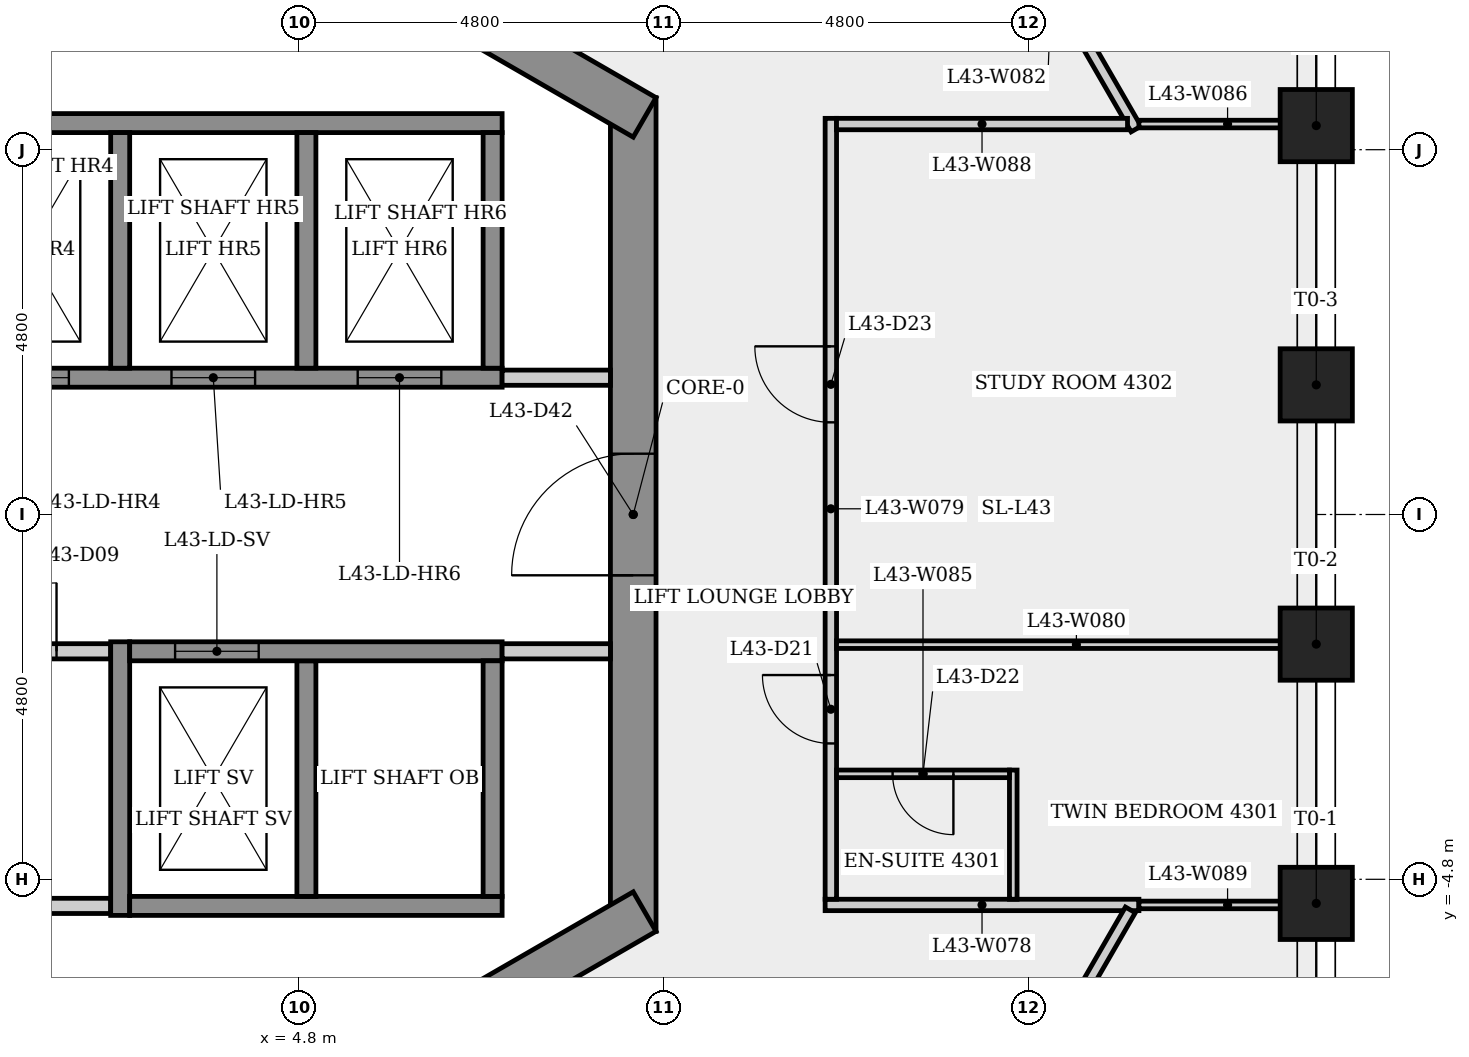
"""IFC4 building model, lengths in metres.
Left out: names, types, materials, properties, quantities, classifications, styles, units other than length and angle.
Written with IfcOpenShell. Run it as: python <this file> out.ifc"""

import sys

from ifc_helpers import new_model, si_unit, direction, frame, frame_2d, origin, origin_2d, place, context, subcontext, project, spatial, rectangle, extrude, element, fill, save


model = new_model("IFC4")
c1 = context("Model", 3, precision=1e-05, world=origin(), true_north=direction((0.0, 1.0)))
c2 = subcontext(c1, "Body", "Model", "MODEL_VIEW")
j1 = project(units=[si_unit("LENGTHUNIT", "METRE"), si_unit("PLANEANGLEUNIT", "RADIAN")], contexts=[c1])
p1 = place(None, origin())
s1 = spatial("IfcSite", under=j1, at=p1, CompositionType="ELEMENT")
p2 = place(p1, origin())
s2 = spatial("IfcBuilding", under=s1, at=p2, CompositionType="ELEMENT")
p3 = place(p2, frame((0.0, 0.0, 162.9)))
s3 = spatial("IfcBuildingStorey", under=s2, at=p3, CompositionType="ELEMENT", Elevation=162.9)
p4 = place(p3, frame((9.2, -5.485, 0.0), z_axis=(0.0, 0.0, 1.0), x_axis=(0.0, 1.0, 0.0)))
e1 = element("IfcWall", 1, at=p4, inside=s3, PredefinedType="SHEAR", context=c2, shape_type="SweptSolid", body=[
    extrude(rectangle(XDim=10.97, YDim=0.6, at=frame_2d((5.485, 0.0))), origin(), (0.0, 0.0, 1.0), 3.4),
])
p5 = place(p4, frame((4.685, 0.0, 0.0)))
e2 = element("IfcOpeningElement", 2, at=p5, cuts=e1, PredefinedType="OPENING", context=c2, shape_type="SweptSolid", body=[
    extrude(rectangle(XDim=1.6, YDim=2.1, at=frame_2d((0.8, 1.05))), frame((0.0, 0.31, 0.0), z_axis=(0.0, -1.0, 0.0), x_axis=(1.0, 0.0, 0.0)), (0.0, 0.0, 1.0), 0.62),
])
p6 = place(p3, frame((9.35, 5.225, 0.0), z_axis=(0.0, 0.0, 1.0), x_axis=(-0.866023993627, 0.500002442456, 0.0)))
e3 = element("IfcWall", 3, at=p6, inside=s3, PredefinedType="SHEAR", context=c2, shape_type="SweptSolid", body=[
    extrude(rectangle(XDim=10.97, YDim=0.6, at=frame_2d((5.485, 0.0))), origin(), (0.0, 0.0, 1.0), 3.4),
])
p7 = place(p6, frame((5.393, 0.0, 0.0)))
e4 = element("IfcOpeningElement", 4, at=p7, cuts=e3, PredefinedType="OPENING", context=c2, shape_type="SweptSolid", body=[
    extrude(rectangle(XDim=0.9, YDim=2.1, at=frame_2d((0.45, 1.05))), frame((0.0, 0.31, 0.0), z_axis=(0.0, -1.0, 0.0), x_axis=(1.0, 0.0, 0.0)), (0.0, 0.0, 1.0), 0.62),
])
p8 = place(p3, frame((-0.15, -10.71, 0.0), z_axis=(0.0, 0.0, 1.0), x_axis=(0.866023993627, 0.500002442456, 0.0)))
e5 = element("IfcWall", 5, at=p8, inside=s3, PredefinedType="SHEAR", context=c2, shape_type="SweptSolid", body=[
    extrude(rectangle(XDim=10.97, YDim=0.6, at=frame_2d((5.485, 0.0))), origin(), (0.0, 0.0, 1.0), 3.4),
])
p9 = place(p8, frame((7.166, 0.0, 0.0)))
e6 = element("IfcOpeningElement", 6, at=p9, cuts=e5, PredefinedType="OPENING", context=c2, shape_type="SweptSolid", body=[
    extrude(rectangle(XDim=0.9, YDim=2.1, at=frame_2d((0.45, 1.05))), frame((0.0, 0.31, 0.0), z_axis=(0.0, -1.0, 0.0), x_axis=(1.0, 0.0, 0.0)), (0.0, 0.0, 1.0), 0.62),
])
for number, where, z_axis, x_axis in (
    (7, (18.187, -5.117, 0.0), (0.0, 0.0, 1.0), (1.0, 0.0, 0.0)),
    (8, (18.187, -1.706, 0.0), (0.0, 0.0, 1.0), (1.0, 0.0, 0.0)),
    (9, (18.187, 1.706, 0.0), (0.0, 0.0, 1.0), (1.0, 0.0, 0.0)),
    (10, (18.187, 5.117, 0.0), (0.0, 0.0, 1.0), (1.0, 0.0, 0.0)),
):
    element("IfcColumn", number, at=place(p3, frame(where, z_axis=z_axis, x_axis=x_axis)), inside=s3, PredefinedType="COLUMN", context=c2, shape_type="SweptSolid", body=[
        extrude(rectangle(XDim=0.95, YDim=0.95, at=origin_2d()), origin(), (0.0, 0.0, 1.0), 3.4),
    ])
p10 = place(p3, frame((-8.88, -5.15, 0.0), z_axis=(0.0, 0.0, 1.0), x_axis=(1.0, 0.0, 0.0)))
e11 = element("IfcWall", 11, at=p10, inside=s3, PredefinedType="PARTITIONING", context=c2, shape_type="SweptSolid", body=[
    extrude(rectangle(XDim=11.205, YDim=0.2, at=frame_2d((5.603, 0.0))), origin(), (0.0, 0.0, 1.0), 3.05),
])
p11 = place(p3, frame((-7.475, 1.8, 0.0), z_axis=(0.0, 0.0, 1.0), x_axis=(1.0, 0.0, 0.0)))
e12 = element("IfcWall", 12, at=p11, inside=s3, PredefinedType="SHEAR", context=c2, shape_type="SweptSolid", body=[
    extrude(rectangle(XDim=14.95, YDim=0.25, at=frame_2d((7.475, 0.0))), origin(), (0.0, 0.0, 1.0), 3.05),
])
p12 = place(p11, frame((0.8, 0.0, 0.0)))
e13 = element("IfcOpeningElement", 13, at=p12, cuts=e12, PredefinedType="OPENING", context=c2, shape_type="SweptSolid", body=[
    extrude(rectangle(XDim=1.1, YDim=2.1, at=frame_2d((0.55, 1.05))), frame((0.0, 0.135, 0.0), z_axis=(0.0, -1.0, 0.0), x_axis=(1.0, 0.0, 0.0)), (0.0, 0.0, 1.0), 0.27),
])
p13 = place(p11, frame((3.25, 0.0, 0.0)))
e14 = element("IfcOpeningElement", 14, at=p13, cuts=e12, PredefinedType="OPENING", context=c2, shape_type="SweptSolid", body=[
    extrude(rectangle(XDim=1.1, YDim=2.1, at=frame_2d((0.55, 1.05))), frame((0.0, 0.135, 0.0), z_axis=(0.0, -1.0, 0.0), x_axis=(1.0, 0.0, 0.0)), (0.0, 0.0, 1.0), 0.27),
])
p14 = place(p11, frame((5.7, 0.0, 0.0)))
e15 = element("IfcOpeningElement", 15, at=p14, cuts=e12, PredefinedType="OPENING", context=c2, shape_type="SweptSolid", body=[
    extrude(rectangle(XDim=1.1, YDim=2.1, at=frame_2d((0.55, 1.05))), frame((0.0, 0.135, 0.0), z_axis=(0.0, -1.0, 0.0), x_axis=(1.0, 0.0, 0.0)), (0.0, 0.0, 1.0), 0.27),
])
p15 = place(p11, frame((8.15, 0.0, 0.0)))
e16 = element("IfcOpeningElement", 16, at=p15, cuts=e12, PredefinedType="OPENING", context=c2, shape_type="SweptSolid", body=[
    extrude(rectangle(XDim=1.1, YDim=2.1, at=frame_2d((0.55, 1.05))), frame((0.0, 0.135, 0.0), z_axis=(0.0, -1.0, 0.0), x_axis=(1.0, 0.0, 0.0)), (0.0, 0.0, 1.0), 0.27),
])
p16 = place(p11, frame((10.6, 0.0, 0.0)))
e17 = element("IfcOpeningElement", 17, at=p16, cuts=e12, PredefinedType="OPENING", context=c2, shape_type="SweptSolid", body=[
    extrude(rectangle(XDim=1.1, YDim=2.1, at=frame_2d((0.55, 1.05))), frame((0.0, 0.135, 0.0), z_axis=(0.0, -1.0, 0.0), x_axis=(1.0, 0.0, 0.0)), (0.0, 0.0, 1.0), 0.27),
])
p17 = place(p11, frame((13.05, 0.0, 0.0)))
e18 = element("IfcOpeningElement", 18, at=p17, cuts=e12, PredefinedType="OPENING", context=c2, shape_type="SweptSolid", body=[
    extrude(rectangle(XDim=1.1, YDim=2.1, at=frame_2d((0.55, 1.05))), frame((0.0, 0.135, 0.0), z_axis=(0.0, -1.0, 0.0), x_axis=(1.0, 0.0, 0.0)), (0.0, 0.0, 1.0), 0.27),
])
p18 = place(p3, frame((-7.225, 5.15, 0.0), z_axis=(0.0, 0.0, 1.0), x_axis=(1.0, 0.0, 0.0)))
e19 = element("IfcWall", 19, at=p18, inside=s3, PredefinedType="SHEAR", context=c2, shape_type="SweptSolid", body=[
    extrude(rectangle(XDim=14.7, YDim=0.25, at=frame_2d((7.35, 0.0))), origin(), (0.0, 0.0, 1.0), 3.05),
])
p19 = place(p3, frame((-8.9, -1.8, 0.0), z_axis=(0.0, 0.0, 1.0), x_axis=(1.0, 0.0, 0.0)))
e20 = element("IfcWall", 20, at=p19, inside=s3, PredefinedType="PARTITIONING", context=c2, shape_type="SweptSolid", body=[
    extrude(rectangle(XDim=11.225, YDim=0.2, at=frame_2d((5.613, 0.0))), origin(), (0.0, 0.0, 1.0), 3.05),
])
p20 = place(p19, frame((3.035, 0.0, 0.0)))
e21 = element("IfcOpeningElement", 21, at=p20, cuts=e20, PredefinedType="OPENING", context=c2, shape_type="SweptSolid", body=[
    extrude(rectangle(XDim=0.9, YDim=2.1, at=frame_2d((0.45, 1.05))), frame((0.0, 0.11, 0.0), z_axis=(0.0, -1.0, 0.0), x_axis=(1.0, 0.0, 0.0)), (0.0, 0.0, 1.0), 0.22),
])
p21 = place(p19, frame((9.613, 0.0, 0.0)))
e22 = element("IfcOpeningElement", 22, at=p21, cuts=e20, PredefinedType="OPENING", context=c2, shape_type="SweptSolid", body=[
    extrude(rectangle(XDim=0.9, YDim=2.1, at=frame_2d((0.45, 1.05))), frame((0.0, 0.11, 0.0), z_axis=(0.0, -1.0, 0.0), x_axis=(1.0, 0.0, 0.0)), (0.0, 0.0, 1.0), 0.22),
])
p22 = place(p3, frame((2.45, -5.275, 0.0), z_axis=(0.0, 0.0, 1.0), x_axis=(0.0, 1.0, 0.0)))
e23 = element("IfcWall", 23, at=p22, inside=s3, PredefinedType="SHEAR", context=c2, shape_type="SweptSolid", body=[
    extrude(rectangle(XDim=3.6, YDim=0.25, at=frame_2d((1.8, 0.0))), origin(), (0.0, 0.0, 1.0), 3.05),
])
p23 = place(p3, frame((2.45, 5.025, 0.0), z_axis=(0.0, 0.0, 1.0), x_axis=(0.0, -1.0, 0.0)))
e24 = element("IfcWall", 24, at=p23, inside=s3, PredefinedType="SHEAR", context=c2, shape_type="SweptSolid", body=[
    extrude(rectangle(XDim=3.1, YDim=0.25, at=frame_2d((1.55, 0.0))), origin(), (0.0, 0.0, 1.0), 3.4),
])
p24 = place(p3, frame((2.575, -5.15, 0.0), z_axis=(0.0, 0.0, 1.0), x_axis=(1.0, 0.0, 0.0)))
e25 = element("IfcWall", 25, at=p24, inside=s3, PredefinedType="SHEAR", context=c2, shape_type="SweptSolid", body=[
    extrude(rectangle(XDim=4.9, YDim=0.25, at=frame_2d((2.45, 0.0))), origin(), (0.0, 0.0, 1.0), 3.05),
])
for number, where, z_axis, x_axis in (
    (26, (4.9, -1.925, 0.0), (0.0, 0.0, 1.0), (0.0, -1.0, 0.0)),
    (27, (4.9, 5.025, 0.0), (0.0, 0.0, 1.0), (0.0, -1.0, 0.0)),
):
    element("IfcWall", number, at=place(p3, frame(where, z_axis=z_axis, x_axis=x_axis)), inside=s3, PredefinedType="SHEAR", context=c2, shape_type="SweptSolid", body=[
        extrude(rectangle(XDim=3.1, YDim=0.25, at=frame_2d((1.55, 0.0))), origin(), (0.0, 0.0, 1.0), 3.4),
    ])
p25 = place(p3, frame((2.575, -1.8, 0.0), z_axis=(0.0, 0.0, 1.0), x_axis=(1.0, 0.0, 0.0)))
e28 = element("IfcWall", 28, at=p25, inside=s3, PredefinedType="SHEAR", context=c2, shape_type="SweptSolid", body=[
    extrude(rectangle(XDim=4.9, YDim=0.25, at=frame_2d((2.45, 0.0))), origin(), (0.0, 0.0, 1.0), 3.05),
])
p26 = place(p25, frame((0.597, 0.0, 0.0)))
e29 = element("IfcOpeningElement", 29, at=p26, cuts=e28, PredefinedType="OPENING", context=c2, shape_type="SweptSolid", body=[
    extrude(rectangle(XDim=1.1, YDim=2.1, at=frame_2d((0.55, 1.05))), frame((0.0, 0.135, 0.0), z_axis=(0.0, -1.0, 0.0), x_axis=(1.0, 0.0, 0.0)), (0.0, 0.0, 1.0), 0.27),
])
p27 = place(p3, frame((7.475, 1.8, 0.0), z_axis=(0.0, 0.0, 1.0), x_axis=(1.0, 0.0, 0.0)))
e30 = element("IfcWall", 30, at=p27, inside=s3, PredefinedType="PARTITIONING", context=c2, shape_type="SweptSolid", body=[
    extrude(rectangle(XDim=1.425, YDim=0.2, at=frame_2d((0.712, 0.0))), origin(), (0.0, 0.0, 1.0), 3.05),
])
for number, where, z_axis, x_axis in (
    (31, (7.35, -1.925, 0.0), (0.0, 0.0, 1.0), (0.0, -1.0, 0.0)),
    (32, (7.35, 5.025, 0.0), (0.0, 0.0, 1.0), (0.0, -1.0, 0.0)),
):
    element("IfcWall", number, at=place(p3, frame(where, z_axis=z_axis, x_axis=x_axis)), inside=s3, PredefinedType="SHEAR", context=c2, shape_type="SweptSolid", body=[
        extrude(rectangle(XDim=3.1, YDim=0.25, at=frame_2d((1.55, 0.0))), origin(), (0.0, 0.0, 1.0), 3.4),
    ])
p28 = place(p3, frame((8.9, -1.8, 0.0), z_axis=(0.0, 0.0, 1.0), x_axis=(-1.0, 0.0, 0.0)))
e33 = element("IfcWall", 33, at=p28, inside=s3, PredefinedType="PARTITIONING", context=c2, shape_type="SweptSolid", body=[
    extrude(rectangle(XDim=1.425, YDim=0.2, at=frame_2d((0.712, 0.0))), origin(), (0.0, 0.0, 1.0), 3.05),
])
p29 = place(p3, frame((11.725, -5.137, 0.0), z_axis=(0.0, 0.0, 1.0), x_axis=(1.0, 0.0, 0.0)))
e34 = element("IfcWall", 34, at=p29, inside=s3, PredefinedType="PARTITIONING", context=c2, shape_type="SweptSolid", body=[
    extrude(rectangle(XDim=4.128, YDim=0.15, at=frame_2d((2.064, 0.0))), origin(), (0.0, 0.0, 1.0), 3.05),
])
p30 = place(p3, frame((11.8, -5.062, 0.0), z_axis=(0.0, 0.0, 1.0), x_axis=(0.0, 1.0, 0.0)))
e35 = element("IfcWall", 35, at=p30, inside=s3, PredefinedType="PARTITIONING", context=c2, shape_type="SweptSolid", body=[
    extrude(rectangle(XDim=10.275, YDim=0.15, at=frame_2d((5.137, 0.0))), origin(), (0.0, 0.0, 1.0), 3.05),
])
p31 = place(p30, frame((2.05, 0.0, 0.0)))
e36 = element("IfcOpeningElement", 36, at=p31, cuts=e35, PredefinedType="OPENING", context=c2, shape_type="SweptSolid", body=[
    extrude(rectangle(XDim=0.9, YDim=2.1, at=frame_2d((0.45, 1.05))), frame((0.0, 0.085, 0.0), z_axis=(0.0, -1.0, 0.0), x_axis=(1.0, 0.0, 0.0)), (0.0, 0.0, 1.0), 0.17),
])
p32 = place(p30, frame((6.275, 0.0, 0.0)))
e37 = element("IfcOpeningElement", 37, at=p32, cuts=e35, PredefinedType="OPENING", context=c2, shape_type="SweptSolid", body=[
    extrude(rectangle(XDim=1.0, YDim=2.1, at=frame_2d((0.5, 1.05))), frame((0.0, 0.085, 0.0), z_axis=(0.0, -1.0, 0.0), x_axis=(1.0, 0.0, 0.0)), (0.0, 0.0, 1.0), 0.17),
])
p33 = place(p3, frame((11.875, -1.712, 0.0), z_axis=(0.0, 0.0, 1.0), x_axis=(1.0, 0.0, 0.0)))
e38 = element("IfcWall", 38, at=p33, inside=s3, PredefinedType="PARTITIONING", context=c2, shape_type="SweptSolid", body=[
    extrude(rectangle(XDim=6.312, YDim=0.1, at=frame_2d((3.156, 0.0))), origin(), (0.0, 0.0, 1.0), 3.05),
])
p34 = place(p3, frame((13.592, 8.925, 0.0), z_axis=(0.0, 0.0, 1.0), x_axis=(0.500040754433, -0.866001872923, 0.0)))
e39 = element("IfcWall", 39, at=p34, inside=s3, PredefinedType="PARTITIONING", context=c2, shape_type="SweptSolid", body=[
    extrude(rectangle(XDim=4.448, YDim=0.15, at=frame_2d((2.224, 0.0))), origin(), (0.0, 0.0, 1.0), 3.05),
])
p35 = place(p34, frame((1.669, 0.0, 0.0)))
e40 = element("IfcOpeningElement", 40, at=p35, cuts=e39, PredefinedType="OPENING", context=c2, shape_type="SweptSolid", body=[
    extrude(rectangle(XDim=1.0, YDim=2.1, at=frame_2d((0.5, 1.05))), frame((0.0, 0.085, 0.0), z_axis=(0.0, -1.0, 0.0), x_axis=(1.0, 0.0, 0.0)), (0.0, 0.0, 1.0), 0.17),
])
p36 = place(p3, frame((14.2, -5.062, 0.0), z_axis=(0.0, 0.0, 1.0), x_axis=(0.0, 1.0, 0.0)))
e41 = element("IfcWall", 41, at=p36, inside=s3, PredefinedType="PARTITIONING", context=c2, shape_type="SweptSolid", body=[
    extrude(rectangle(XDim=1.7, YDim=0.1, at=frame_2d((0.85, 0.0))), origin(), (0.0, 0.0, 1.0), 3.05),
])
p37 = place(p3, frame((14.15, -3.413, 0.0), z_axis=(0.0, 0.0, 1.0), x_axis=(-1.0, 0.0, 0.0)))
e42 = element("IfcWall", 42, at=p37, inside=s3, PredefinedType="PARTITIONING", context=c2, shape_type="SweptSolid", body=[
    extrude(rectangle(XDim=2.275, YDim=0.1, at=frame_2d((1.137, 0.0))), origin(), (0.0, 0.0, 1.0), 3.05),
])
p38 = place(p37, frame((0.738, 0.0, 0.0)))
e43 = element("IfcOpeningElement", 43, at=p38, cuts=e42, PredefinedType="OPENING", context=c2, shape_type="SweptSolid", body=[
    extrude(rectangle(XDim=0.8, YDim=2.1, at=frame_2d((0.4, 1.05))), frame((0.0, 0.06, 0.0), z_axis=(0.0, -1.0, 0.0), x_axis=(1.0, 0.0, 0.0)), (0.0, 0.0, 1.0), 0.12),
])
p39 = place(p3, frame((15.853, 5.137, 0.0), z_axis=(0.0, 0.0, 1.0), x_axis=(1.0, 0.0, 0.0)))
e44 = element("IfcWall", 44, at=p39, inside=s3, PredefinedType="PARTITIONING", context=c2, shape_type="SweptSolid", body=[
    extrude(rectangle(XDim=2.333, YDim=0.1, at=frame_2d((1.167, 0.0))), origin(), (0.0, 0.0, 1.0), 3.05),
])
p40 = place(p3, frame((15.741, -5.202, 0.0), z_axis=(0.0, 0.0, 1.0), x_axis=(-0.499974030515, -0.866040396754, 0.0)))
e45 = element("IfcWall", 45, at=p40, inside=s3, PredefinedType="PARTITIONING", context=c2, shape_type="SweptSolid", body=[
    extrude(rectangle(XDim=7.812, YDim=0.15, at=frame_2d((3.906, 0.0))), origin(), (0.0, 0.0, 1.0), 3.05),
])
p41 = place(p40, frame((3.406, 0.0, 0.0)))
e46 = element("IfcOpeningElement", 46, at=p41, cuts=e45, PredefinedType="OPENING", context=c2, shape_type="SweptSolid", body=[
    extrude(rectangle(XDim=1.0, YDim=2.1, at=frame_2d((0.5, 1.05))), frame((0.0, 0.085, 0.0), z_axis=(0.0, -1.0, 0.0), x_axis=(1.0, 0.0, 0.0)), (0.0, 0.0, 1.0), 0.17),
])
p42 = place(p3, frame((15.703, 5.137, 0.0), z_axis=(0.0, 0.0, 1.0), x_axis=(-1.0, 0.0, 0.0)))
e47 = element("IfcWall", 47, at=p42, inside=s3, PredefinedType="PARTITIONING", context=c2, shape_type="SweptSolid", body=[
    extrude(rectangle(XDim=3.828, YDim=0.15, at=frame_2d((1.914, 0.0))), origin(), (0.0, 0.0, 1.0), 3.05),
])
p43 = place(p3, frame((18.187, -5.137, 0.0), z_axis=(0.0, 0.0, 1.0), x_axis=(-1.0, 0.0, 0.0)))
e48 = element("IfcWall", 48, at=p43, inside=s3, PredefinedType="PARTITIONING", context=c2, shape_type="SweptSolid", body=[
    extrude(rectangle(XDim=2.333, YDim=0.1, at=frame_2d((1.167, 0.0))), origin(), (0.0, 0.0, 1.0), 3.05),
])
p44 = place(p15, origin())
e49 = element("IfcDoor", 49, at=p44, inside=s3, OperationType="SLIDING_TO_LEFT", PredefinedType="DOOR", context=c2, shape_type="SweptSolid", body=[
    extrude(rectangle(XDim=1.1, YDim=2.1, at=frame_2d((0.55, 1.05))), frame((0.0, 0.025, 0.0), z_axis=(0.0, -1.0, 0.0), x_axis=(1.0, 0.0, 0.0)), (0.0, 0.0, 1.0), 0.05),
])
fill(e16, e49)
p45 = place(p16, origin())
e50 = element("IfcDoor", 50, at=p45, inside=s3, OperationType="SLIDING_TO_LEFT", PredefinedType="DOOR", context=c2, shape_type="SweptSolid", body=[
    extrude(rectangle(XDim=1.1, YDim=2.1, at=frame_2d((0.55, 1.05))), frame((0.0, 0.025, 0.0), z_axis=(0.0, -1.0, 0.0), x_axis=(1.0, 0.0, 0.0)), (0.0, 0.0, 1.0), 0.05),
])
fill(e17, e50)
p46 = place(p17, origin())
e51 = element("IfcDoor", 51, at=p46, inside=s3, OperationType="SLIDING_TO_LEFT", PredefinedType="DOOR", context=c2, shape_type="SweptSolid", body=[
    extrude(rectangle(XDim=1.1, YDim=2.1, at=frame_2d((0.55, 1.05))), frame((0.0, 0.025, 0.0), z_axis=(0.0, -1.0, 0.0), x_axis=(1.0, 0.0, 0.0)), (0.0, 0.0, 1.0), 0.05),
])
fill(e18, e51)
p47 = place(p26, origin())
e52 = element("IfcDoor", 52, at=p47, inside=s3, OperationType="SLIDING_TO_LEFT", PredefinedType="DOOR", context=c2, shape_type="SweptSolid", body=[
    extrude(rectangle(XDim=1.1, YDim=2.1, at=frame_2d((0.55, 1.05))), frame((0.0, 0.025, 0.0), z_axis=(0.0, -1.0, 0.0), x_axis=(1.0, 0.0, 0.0)), (0.0, 0.0, 1.0), 0.05),
])
fill(e29, e52)
p48 = place(p21, origin())
e53 = element("IfcDoor", 53, at=p48, inside=s3, OperationType="SINGLE_SWING_RIGHT", PredefinedType="DOOR", context=c2, shape_type="SweptSolid", body=[
    extrude(rectangle(XDim=0.9, YDim=2.1, at=frame_2d((0.45, 1.05))), frame((0.0, 0.025, 0.0), z_axis=(0.0, -1.0, 0.0), x_axis=(1.0, 0.0, 0.0)), (0.0, 0.0, 1.0), 0.05),
])
fill(e22, e53)
p49 = place(p31, origin())
e54 = element("IfcDoor", 54, at=p49, inside=s3, OperationType="SINGLE_SWING_RIGHT", PredefinedType="DOOR", context=c2, shape_type="SweptSolid", body=[
    extrude(rectangle(XDim=0.9, YDim=2.1, at=frame_2d((0.45, 1.05))), frame((0.0, 0.025, 0.0), z_axis=(0.0, -1.0, 0.0), x_axis=(1.0, 0.0, 0.0)), (0.0, 0.0, 1.0), 0.05),
])
fill(e36, e54)
p50 = place(p38, origin())
e55 = element("IfcDoor", 55, at=p50, inside=s3, OperationType="SINGLE_SWING_LEFT", PredefinedType="DOOR", context=c2, shape_type="SweptSolid", body=[
    extrude(rectangle(XDim=0.8, YDim=2.1, at=frame_2d((0.4, 1.05))), frame((0.0, 0.025, 0.0), z_axis=(0.0, -1.0, 0.0), x_axis=(1.0, 0.0, 0.0)), (0.0, 0.0, 1.0), 0.05),
])
fill(e43, e55)
p51 = place(p32, origin())
e56 = element("IfcDoor", 56, at=p51, inside=s3, OperationType="SINGLE_SWING_RIGHT", PredefinedType="DOOR", context=c2, shape_type="SweptSolid", body=[
    extrude(rectangle(XDim=1.0, YDim=2.1, at=frame_2d((0.5, 1.05))), frame((0.0, 0.025, 0.0), z_axis=(0.0, -1.0, 0.0), x_axis=(1.0, 0.0, 0.0)), (0.0, 0.0, 1.0), 0.05),
])
fill(e37, e56)
p52 = place(p5, origin())
e57 = element("IfcDoor", 57, at=p52, inside=s3, OperationType="SINGLE_SWING_LEFT", PredefinedType="DOOR", context=c2, shape_type="SweptSolid", body=[
    extrude(rectangle(XDim=1.6, YDim=2.1, at=frame_2d((0.8, 1.05))), frame((0.0, 0.025, 0.0), z_axis=(0.0, -1.0, 0.0), x_axis=(1.0, 0.0, 0.0)), (0.0, 0.0, 1.0), 0.05),
])
fill(e2, e57)
save(model, sys.argv[1])
